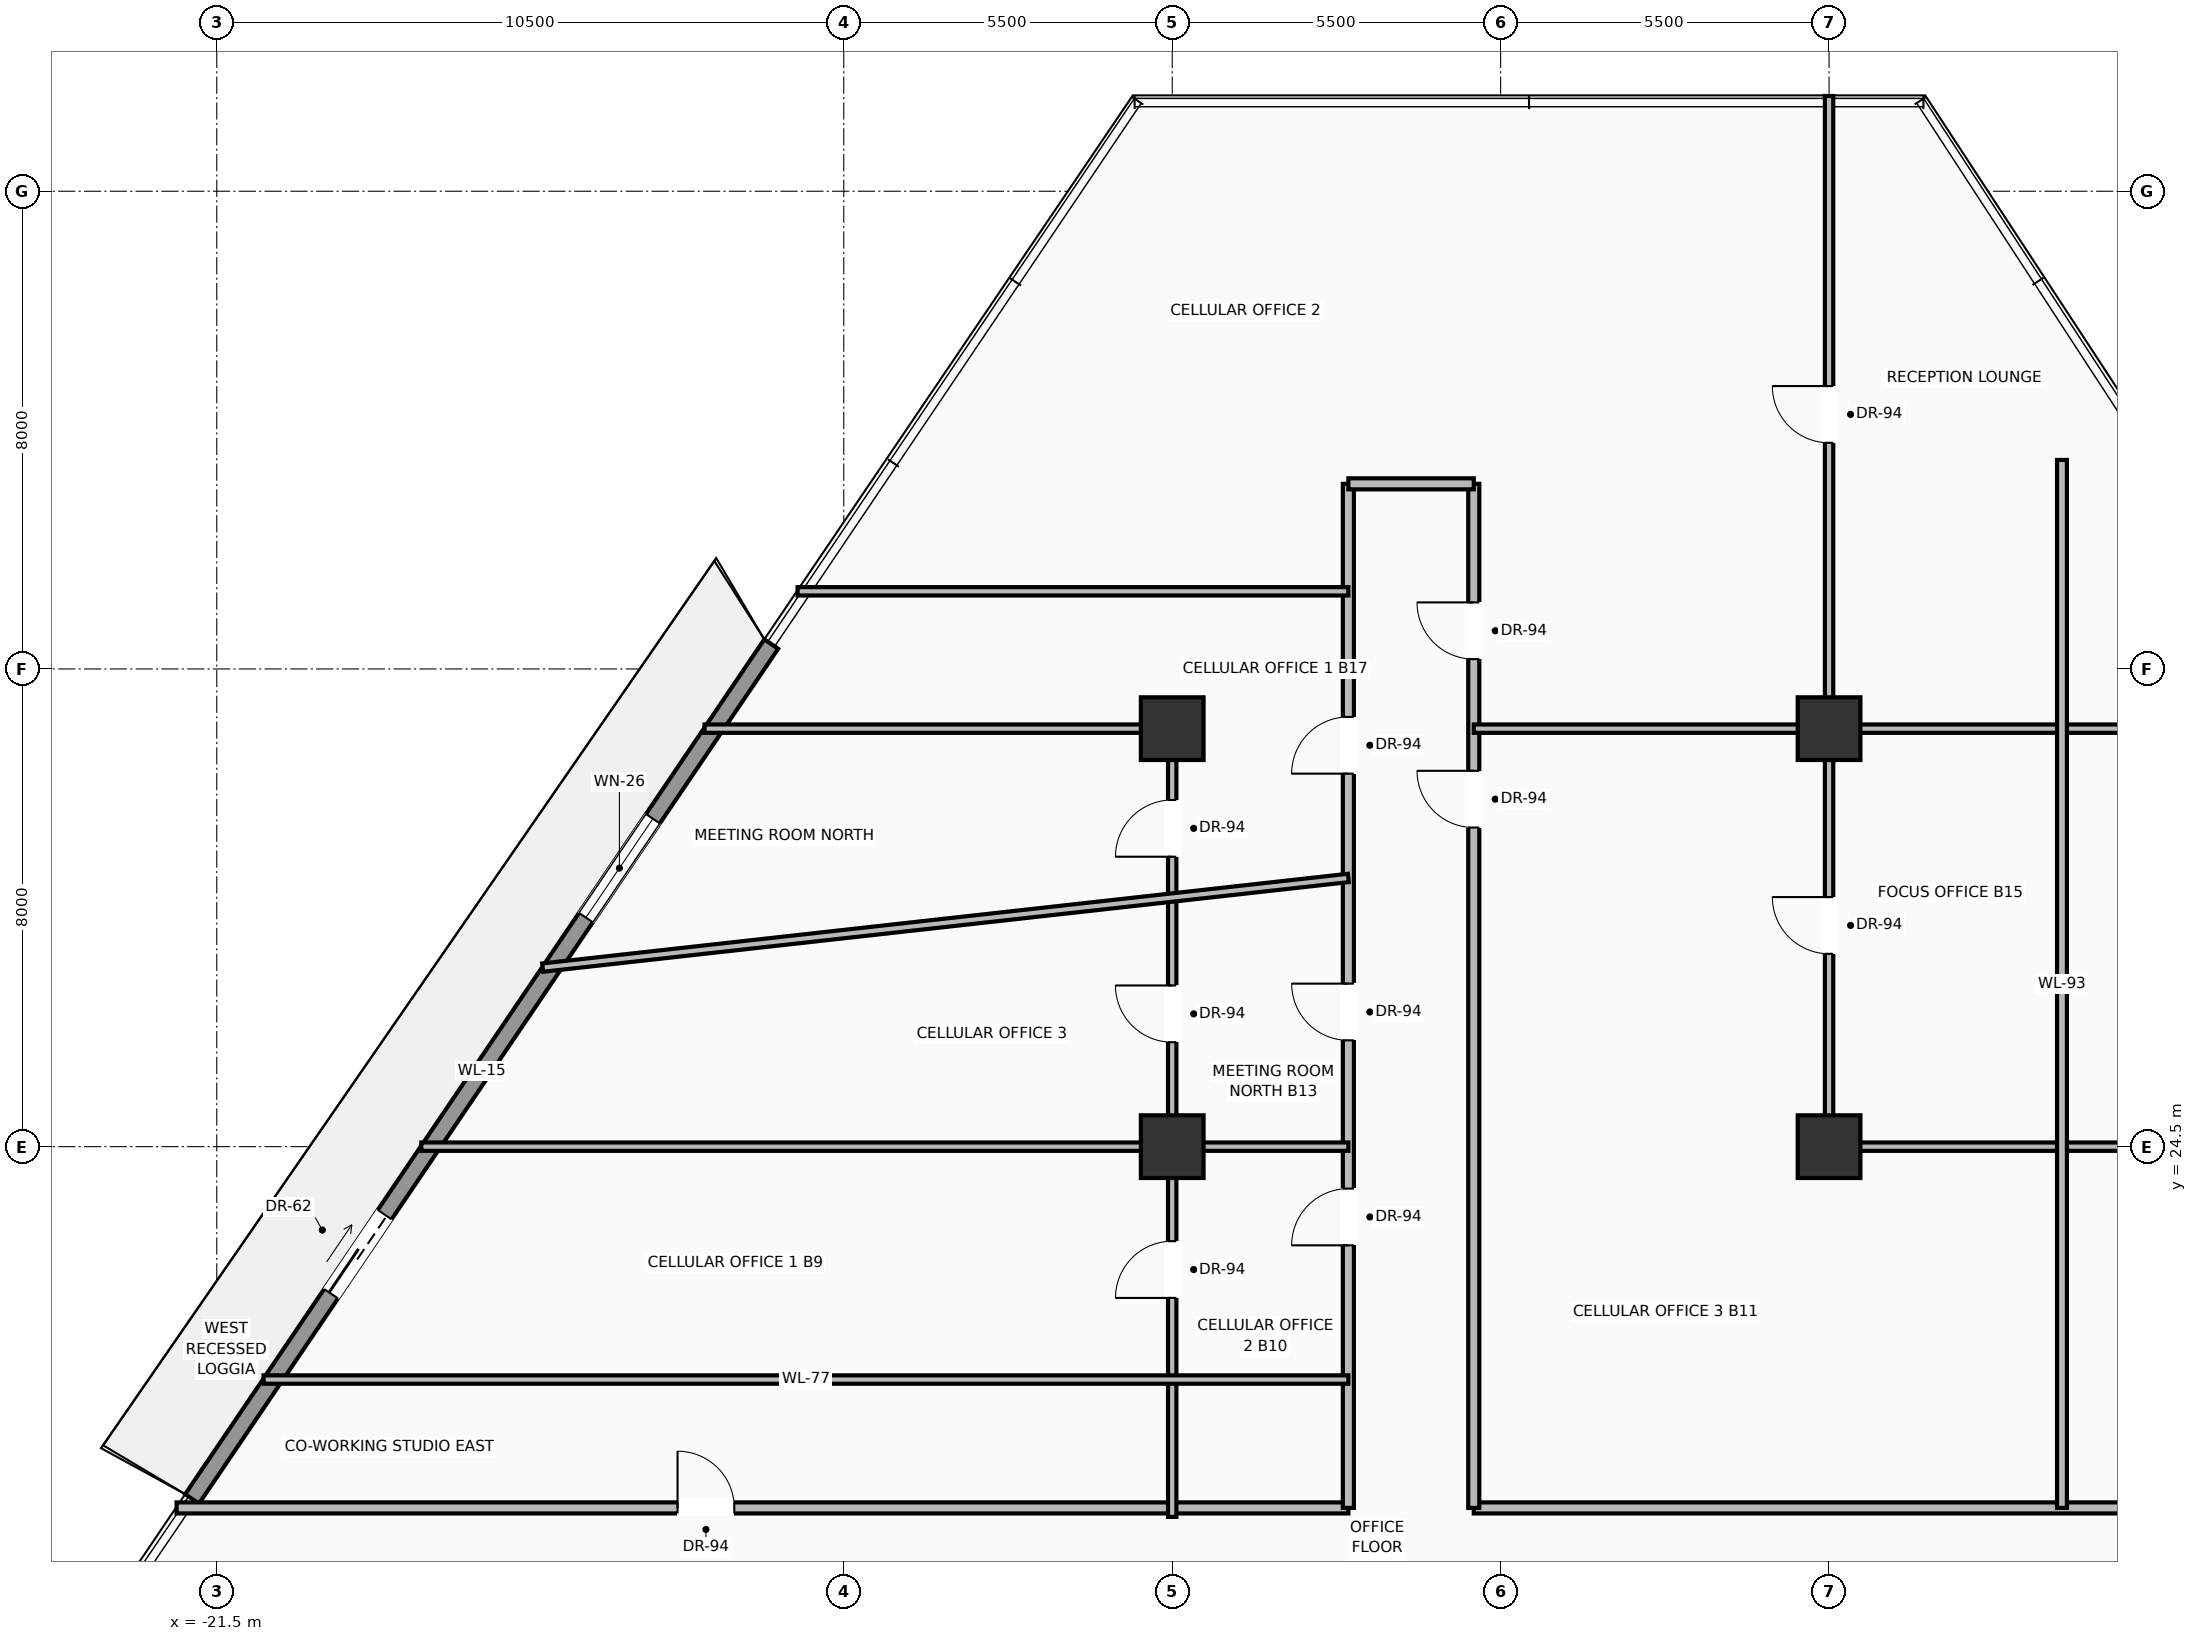
"""IFC4 building model, lengths in metres.
Left out: names, types, materials, properties, quantities, classifications, styles, units other than length and angle.
Written with IfcOpenShell. Run it as: python <this file> out.ifc"""

import sys

from ifc_helpers import new_model, si_unit, direction, frame, frame_2d, origin, origin_2d, place, context, subcontext, project, spatial, rectangle, extrude, source, transform, mapped, element, fill, save


model = new_model("IFC4")
c1 = context("Model", 3, precision=1e-05, world=origin(), true_north=direction((0.0, 1.0)))
c2 = subcontext(c1, "Body", "Model", "MODEL_VIEW")
j1 = project(units=[si_unit("LENGTHUNIT", "METRE"), si_unit("PLANEANGLEUNIT", "RADIAN")], contexts=[c1])
p1 = place(None, origin())
s1 = spatial("IfcSite", under=j1, at=p1, CompositionType="ELEMENT")
p2 = place(p1, origin())
s2 = spatial("IfcBuilding", under=s1, at=p2, CompositionType="ELEMENT")
p3 = place(p2, frame((0.0, 0.0, 76.6)))
s3 = spatial("IfcBuildingStorey", under=s2, at=p3, CompositionType="ELEMENT", Elevation=76.6)
m1 = source(origin(), c2, "Body", "SweptSolid", [
    extrude(rectangle(XDim=1.05, YDim=1.05, at=origin_2d()), origin(), (0.0, 0.0, 1.0), 3.7),
])
for number, where, z_axis, x_axis in (
    (1, (-5.5, 24.5, 0.0), (0.0, 0.0, 1.0), (1.0, 0.0, 0.0)),
    (2, (5.5, 24.5, 0.0), (0.0, 0.0, 1.0), (1.0, 0.0, 0.0)),
    (3, (-5.5, 31.5, 0.0), (0.0, 0.0, 1.0), (1.0, 0.0, 0.0)),
    (4, (5.5, 31.5, 0.0), (0.0, 0.0, 1.0), (1.0, 0.0, 0.0)),
):
    element("IfcColumn", number, at=place(p3, frame(where, z_axis=z_axis, x_axis=x_axis)), inside=s3, PredefinedType="COLUMN", context=c2, shape_type="MappedRepresentation", body=[
        mapped(m1, transform((0.0, 0.0, 0.0), scale=1.0)),
    ])
p4 = place(p3, frame((-21.913, 18.602, 0.0), z_axis=(0.0, 0.0, 1.0), x_axis=(0.560872496689, 0.827902193775, 0.0)))
e5 = element("IfcWall", 5, at=p4, inside=s3, PredefinedType="SOLIDWALL", context=c2, shape_type="SweptSolid", body=[
    extrude(rectangle(XDim=17.291, YDim=0.28, at=frame_2d((8.646, 0.0))), origin(), (0.0, 0.0, 1.0), 3.03),
])
p5 = place(p4, frame((4.15, 0.0, 0.0)))
e6 = element("IfcOpeningElement", 6, at=p5, cuts=e5, PredefinedType="OPENING", context=c2, shape_type="SweptSolid", body=[
    extrude(rectangle(XDim=1.6, YDim=2.35, at=frame_2d((0.8, 1.175))), frame((0.0, 0.15, 0.0), z_axis=(0.0, -1.0, 0.0), x_axis=(1.0, 0.0, 0.0)), (0.0, 0.0, 1.0), 0.3),
])
p6 = place(p4, frame((11.758, 0.0, 0.9)))
e7 = element("IfcOpeningElement", 7, at=p6, cuts=e5, PredefinedType="OPENING", context=c2, shape_type="SweptSolid", body=[
    extrude(rectangle(XDim=2.0, YDim=1.85, at=frame_2d((1.0, 0.925))), frame((0.0, 0.15, 0.0), z_axis=(0.0, -1.0, 0.0), x_axis=(1.0, 0.0, 0.0)), (0.0, 0.0, 1.0), 0.3),
])
p7 = place(p3, frame((-22.173, 18.45, 0.0), z_axis=(0.0, 0.0, 1.0), x_axis=(1.0, 0.0, 0.0)))
e8 = element("IfcWall", 8, at=p7, inside=s3, PredefinedType="PARTITIONING", context=c2, shape_type="SweptSolid", body=[
    extrude(rectangle(XDim=19.623, YDim=0.185, at=frame_2d((9.812, 0.0))), origin(), (0.0, 0.0, 1.0), 2.747),
])
p8 = place(p7, frame((8.389, 0.0, 0.0)))
e9 = element("IfcOpeningElement", 9, at=p8, cuts=e8, PredefinedType="OPENING", context=c2, shape_type="SweptSolid", body=[
    extrude(rectangle(XDim=0.95, YDim=2.2, at=frame_2d((0.475, 1.1))), frame((0.0, 0.103, 0.0), z_axis=(0.0, -1.0, 0.0), x_axis=(1.0, 0.0, 0.0)), (0.0, 0.0, 1.0), 0.205),
])
p9 = place(p3, frame((-0.45, 18.45, 0.0), z_axis=(0.0, 0.0, 1.0), x_axis=(1.0, 0.0, 0.0)))
e10 = element("IfcWall", 10, at=p9, inside=s3, PredefinedType="PARTITIONING", context=c2, shape_type="SweptSolid", body=[
    extrude(rectangle(XDim=23.04, YDim=0.185, at=frame_2d((11.52, 0.0))), origin(), (0.0, 0.0, 1.0), 2.747),
])
p10 = place(p9, frame((12.163, 0.0, 0.0)))
e11 = element("IfcOpeningElement", 11, at=p10, cuts=e10, PredefinedType="OPENING", context=c2, shape_type="SweptSolid", body=[
    extrude(rectangle(XDim=0.95, YDim=2.2, at=frame_2d((0.475, 1.1))), frame((0.0, 0.103, 0.0), z_axis=(0.0, -1.0, 0.0), x_axis=(1.0, 0.0, 0.0)), (0.0, 0.0, 1.0), 0.205),
])
p11 = place(p3, frame((-2.55, 18.45, 0.0), z_axis=(0.0, 0.0, 1.0), x_axis=(0.0, 1.0, 0.0)))
e12 = element("IfcWall", 12, at=p11, inside=s3, PredefinedType="PARTITIONING", context=c2, shape_type="SweptSolid", body=[
    extrude(rectangle(XDim=17.15, YDim=0.185, at=frame_2d((8.575, 0.0))), origin(), (0.0, 0.0, 1.0), 2.747),
])
p12 = place(p11, frame((4.397, 0.0, 0.0)))
e13 = element("IfcOpeningElement", 13, at=p12, cuts=e12, PredefinedType="OPENING", context=c2, shape_type="SweptSolid", body=[
    extrude(rectangle(XDim=0.95, YDim=2.2, at=frame_2d((0.475, 1.1))), frame((0.0, 0.103, 0.0), z_axis=(0.0, -1.0, 0.0), x_axis=(1.0, 0.0, 0.0)), (0.0, 0.0, 1.0), 0.205),
])
p13 = place(p11, frame((7.83, 0.0, 0.0)))
e14 = element("IfcOpeningElement", 14, at=p13, cuts=e12, PredefinedType="OPENING", context=c2, shape_type="SweptSolid", body=[
    extrude(rectangle(XDim=0.95, YDim=2.2, at=frame_2d((0.475, 1.1))), frame((0.0, 0.103, 0.0), z_axis=(0.0, -1.0, 0.0), x_axis=(1.0, 0.0, 0.0)), (0.0, 0.0, 1.0), 0.205),
])
p14 = place(p11, frame((12.296, 0.0, 0.0)))
e15 = element("IfcOpeningElement", 15, at=p14, cuts=e12, PredefinedType="OPENING", context=c2, shape_type="SweptSolid", body=[
    extrude(rectangle(XDim=0.95, YDim=2.2, at=frame_2d((0.475, 1.1))), frame((0.0, 0.103, 0.0), z_axis=(0.0, -1.0, 0.0), x_axis=(1.0, 0.0, 0.0)), (0.0, 0.0, 1.0), 0.205),
])
p15 = place(p3, frame((-0.45, 18.45, 0.0), z_axis=(0.0, 0.0, 1.0), x_axis=(0.0, 1.0, 0.0)))
e16 = element("IfcWall", 16, at=p15, inside=s3, PredefinedType="PARTITIONING", context=c2, shape_type="SweptSolid", body=[
    extrude(rectangle(XDim=17.15, YDim=0.185, at=frame_2d((8.575, 0.0))), origin(), (0.0, 0.0, 1.0), 2.747),
])
p16 = place(p15, frame((11.394, 0.0, 0.0)))
e17 = element("IfcOpeningElement", 17, at=p16, cuts=e16, PredefinedType="OPENING", context=c2, shape_type="SweptSolid", body=[
    extrude(rectangle(XDim=0.95, YDim=2.2, at=frame_2d((0.475, 1.1))), frame((0.0, 0.103, 0.0), z_axis=(0.0, -1.0, 0.0), x_axis=(1.0, 0.0, 0.0)), (0.0, 0.0, 1.0), 0.205),
])
p17 = place(p15, frame((14.214, 0.0, 0.0)))
e18 = element("IfcOpeningElement", 18, at=p17, cuts=e16, PredefinedType="OPENING", context=c2, shape_type="SweptSolid", body=[
    extrude(rectangle(XDim=0.95, YDim=2.2, at=frame_2d((0.475, 1.1))), frame((0.0, 0.103, 0.0), z_axis=(0.0, -1.0, 0.0), x_axis=(1.0, 0.0, 0.0)), (0.0, 0.0, 1.0), 0.205),
])
p18 = place(p3, frame((-2.55, 35.6, 0.0), z_axis=(0.0, 0.0, 1.0), x_axis=(1.0, 0.0, 0.0)))
e19 = element("IfcWall", 19, at=p18, inside=s3, PredefinedType="PARTITIONING", context=c2, shape_type="SweptSolid", body=[
    extrude(rectangle(XDim=2.1, YDim=0.185, at=frame_2d((1.05, 0.0))), origin(), (0.0, 0.0, 1.0), 3.442),
])
p19 = place(p3, frame((-5.5, 18.3, 0.0), z_axis=(0.0, 0.0, 1.0), x_axis=(0.0, 1.0, 0.0)))
e20 = element("IfcWall", 20, at=p19, inside=s3, PredefinedType="PARTITIONING", context=c2, shape_type="SweptSolid", body=[
    extrude(rectangle(XDim=13.2, YDim=0.14, at=frame_2d((6.6, 0.0))), origin(), (0.0, 0.0, 1.0), 2.747),
])
p20 = place(p19, frame((3.667, 0.0, 0.0)))
e21 = element("IfcOpeningElement", 21, at=p20, cuts=e20, PredefinedType="OPENING", context=c2, shape_type="SweptSolid", body=[
    extrude(rectangle(XDim=0.95, YDim=2.2, at=frame_2d((0.475, 1.1))), frame((0.0, 0.08, 0.0), z_axis=(0.0, -1.0, 0.0), x_axis=(1.0, 0.0, 0.0)), (0.0, 0.0, 1.0), 0.16),
])
p21 = place(p19, frame((7.949, 0.0, 0.0)))
e22 = element("IfcOpeningElement", 22, at=p21, cuts=e20, PredefinedType="OPENING", context=c2, shape_type="SweptSolid", body=[
    extrude(rectangle(XDim=0.95, YDim=2.2, at=frame_2d((0.475, 1.1))), frame((0.0, 0.08, 0.0), z_axis=(0.0, -1.0, 0.0), x_axis=(1.0, 0.0, 0.0)), (0.0, 0.0, 1.0), 0.16),
])
p22 = place(p19, frame((11.055, 0.0, 0.0)))
e23 = element("IfcOpeningElement", 23, at=p22, cuts=e20, PredefinedType="OPENING", context=c2, shape_type="SweptSolid", body=[
    extrude(rectangle(XDim=0.95, YDim=2.2, at=frame_2d((0.475, 1.1))), frame((0.0, 0.08, 0.0), z_axis=(0.0, -1.0, 0.0), x_axis=(1.0, 0.0, 0.0)), (0.0, 0.0, 1.0), 0.16),
])
p23 = place(p3, frame((5.5, 24.5, 0.0), z_axis=(0.0, 0.0, 1.0), x_axis=(0.0, 1.0, 0.0)))
e24 = element("IfcWall", 24, at=p23, inside=s3, PredefinedType="PARTITIONING", context=c2, shape_type="SweptSolid", body=[
    extrude(rectangle(XDim=17.595, YDim=0.14, at=frame_2d((8.798, 0.0))), origin(), (0.0, 0.0, 1.0), 2.747),
])
p24 = place(p23, frame((3.23, 0.0, 0.0)))
e25 = element("IfcOpeningElement", 25, at=p24, cuts=e24, PredefinedType="OPENING", context=c2, shape_type="SweptSolid", body=[
    extrude(rectangle(XDim=0.95, YDim=2.2, at=frame_2d((0.475, 1.1))), frame((0.0, 0.08, 0.0), z_axis=(0.0, -1.0, 0.0), x_axis=(1.0, 0.0, 0.0)), (0.0, 0.0, 1.0), 0.16),
])
p25 = place(p23, frame((11.787, 0.0, 0.0)))
e26 = element("IfcOpeningElement", 26, at=p25, cuts=e24, PredefinedType="OPENING", context=c2, shape_type="SweptSolid", body=[
    extrude(rectangle(XDim=0.95, YDim=2.2, at=frame_2d((0.475, 1.1))), frame((0.0, 0.08, 0.0), z_axis=(0.0, -1.0, 0.0), x_axis=(1.0, 0.0, 0.0)), (0.0, 0.0, 1.0), 0.16),
])
p26 = place(p3, frame((-13.332, 31.5, 0.0), z_axis=(0.0, 0.0, 1.0), x_axis=(1.0, 0.0, 0.0)))
e27 = element("IfcWall", 27, at=p26, inside=s3, PredefinedType="PARTITIONING", context=c2, shape_type="SweptSolid", body=[
    extrude(rectangle(XDim=7.832, YDim=0.14, at=frame_2d((3.916, 0.0))), origin(), (0.0, 0.0, 1.0), 2.747),
])
p27 = place(p3, frame((5.5, 24.5, 0.0), z_axis=(0.0, 0.0, 1.0), x_axis=(1.0, 0.0, 0.0)))
e28 = element("IfcWall", 28, at=p27, inside=s3, PredefinedType="PARTITIONING", context=c2, shape_type="SweptSolid", body=[
    extrude(rectangle(XDim=13.128, YDim=0.14, at=frame_2d((6.564, 0.0))), origin(), (0.0, 0.0, 1.0), 2.747),
])
p28 = place(p27, frame((7.803, 0.0, 0.0)))
e29 = element("IfcOpeningElement", 29, at=p28, cuts=e28, PredefinedType="OPENING", context=c2, shape_type="SweptSolid", body=[
    extrude(rectangle(XDim=0.95, YDim=2.2, at=frame_2d((0.475, 1.1))), frame((0.0, 0.08, 0.0), z_axis=(0.0, -1.0, 0.0), x_axis=(1.0, 0.0, 0.0)), (0.0, 0.0, 1.0), 0.16),
])
p29 = place(p3, frame((-20.716, 20.6, 0.0), z_axis=(0.0, 0.0, 1.0), x_axis=(1.0, 0.0, 0.0)))
e30 = element("IfcWall", 30, at=p29, inside=s3, PredefinedType="PARTITIONING", context=c2, shape_type="SweptSolid", body=[
    extrude(rectangle(XDim=18.166, YDim=0.14, at=frame_2d((9.083, 0.0))), origin(), (0.0, 0.0, 1.0), 2.747),
])
p30 = place(p3, frame((-18.074, 24.5, 0.0), z_axis=(0.0, 0.0, 1.0), x_axis=(1.0, 0.0, 0.0)))
e31 = element("IfcWall", 31, at=p30, inside=s3, PredefinedType="PARTITIONING", context=c2, shape_type="SweptSolid", body=[
    extrude(rectangle(XDim=15.524, YDim=0.14, at=frame_2d((7.762, 0.0))), origin(), (0.0, 0.0, 1.0), 2.747),
])
p31 = place(p3, frame((-16.043, 27.498, 0.0), z_axis=(0.0, 0.0, 1.0), x_axis=(0.993863542096, 0.110613108137, 0.0)))
e32 = element("IfcWall", 32, at=p31, inside=s3, PredefinedType="PARTITIONING", context=c2, shape_type="SweptSolid", body=[
    extrude(rectangle(XDim=13.576, YDim=0.14, at=frame_2d((6.788, 0.0))), origin(), (0.0, 0.0, 1.0), 2.747),
])
p32 = place(p3, frame((-11.774, 33.8, 0.0), z_axis=(0.0, 0.0, 1.0), x_axis=(1.0, 0.0, 0.0)))
e33 = element("IfcWall", 33, at=p32, inside=s3, PredefinedType="PARTITIONING", context=c2, shape_type="SweptSolid", body=[
    extrude(rectangle(XDim=9.224, YDim=0.14, at=frame_2d((4.612, 0.0))), origin(), (0.0, 0.0, 1.0), 2.747),
])
p33 = place(p3, frame((-0.45, 31.5, 0.0), z_axis=(0.0, 0.0, 1.0), x_axis=(1.0, 0.0, 0.0)))
e34 = element("IfcWall", 34, at=p33, inside=s3, PredefinedType="PARTITIONING", context=c2, shape_type="SweptSolid", body=[
    extrude(rectangle(XDim=14.493, YDim=0.14, at=frame_2d((7.247, 0.0))), origin(), (0.0, 0.0, 1.0), 2.747),
])
p34 = place(p3, frame((9.4, 18.45, 0.0), z_axis=(0.0, 0.0, 1.0), x_axis=(0.0, 1.0, 0.0)))
e35 = element("IfcWall", 35, at=p34, inside=s3, PredefinedType="PARTITIONING", context=c2, shape_type="SweptSolid", body=[
    extrude(rectangle(XDim=17.55, YDim=0.165, at=frame_2d((8.775, 0.0))), origin(), (0.0, 0.0, 1.0), 2.747),
])
m2 = source(origin(), c2, "Body", "SweptSolid", [
    extrude(rectangle(XDim=1.6, YDim=2.35, at=frame_2d((0.8, 1.175))), frame((0.0, 0.025, 0.0), z_axis=(0.0, -1.0, 0.0), x_axis=(1.0, 0.0, 0.0)), (0.0, 0.0, 1.0), 0.05),
])
p35 = place(p5, origin())
e36 = element("IfcDoor", 36, at=p35, inside=s3, OperationType="SLIDING_TO_LEFT", PredefinedType="DOOR", context=c2, shape_type="MappedRepresentation", body=[
    mapped(m2, transform((0.0, 0.0, 0.0), scale=1.0)),
])
fill(e6, e36)
m3 = source(origin(), c2, "Body", "SweptSolid", [
    extrude(rectangle(XDim=2.0, YDim=1.85, at=frame_2d((1.0, 0.925))), frame((0.0, 0.03, 0.0), z_axis=(0.0, -1.0, 0.0), x_axis=(1.0, 0.0, 0.0)), (0.0, 0.0, 1.0), 0.06),
])
p36 = place(p6, origin())
e37 = element("IfcWindow", 37, at=p36, inside=s3, PartitioningType="SINGLE_PANEL", PredefinedType="WINDOW", context=c2, shape_type="MappedRepresentation", body=[
    mapped(m3, transform((0.0, 0.0, 0.0), scale=1.0)),
])
fill(e7, e37)
m4 = source(origin(), c2, "Body", "SweptSolid", [
    extrude(rectangle(XDim=0.95, YDim=2.2, at=frame_2d((0.475, 1.1))), frame((0.0, 0.025, 0.0), z_axis=(0.0, -1.0, 0.0), x_axis=(1.0, 0.0, 0.0)), (0.0, 0.0, 1.0), 0.05),
])
p37 = place(p8, origin())
e38 = element("IfcDoor", 38, at=p37, inside=s3, OperationType="SINGLE_SWING_LEFT", PredefinedType="DOOR", context=c2, shape_type="MappedRepresentation", body=[
    mapped(m4, transform((0.0, 0.0, 0.0), scale=1.0)),
])
fill(e9, e38)
p38 = place(p12, origin())
e39 = element("IfcDoor", 39, at=p38, inside=s3, OperationType="SINGLE_SWING_LEFT", PredefinedType="DOOR", context=c2, shape_type="MappedRepresentation", body=[
    mapped(m4, transform((0.0, 0.0, 0.0), scale=1.0)),
])
fill(e13, e39)
p39 = place(p16, origin())
e40 = element("IfcDoor", 40, at=p39, inside=s3, OperationType="SINGLE_SWING_RIGHT", PredefinedType="DOOR", context=c2, shape_type="MappedRepresentation", body=[
    mapped(m4, transform((0.0, 0.0, 0.0), scale=1.0)),
])
fill(e17, e40)
p40 = place(p20, origin())
e41 = element("IfcDoor", 41, at=p40, inside=s3, OperationType="SINGLE_SWING_LEFT", PredefinedType="DOOR", context=c2, shape_type="MappedRepresentation", body=[
    mapped(m4, transform((0.0, 0.0, 0.0), scale=1.0)),
])
fill(e21, e41)
p41 = place(p13, origin())
e42 = element("IfcDoor", 42, at=p41, inside=s3, OperationType="SINGLE_SWING_RIGHT", PredefinedType="DOOR", context=c2, shape_type="MappedRepresentation", body=[
    mapped(m4, transform((0.0, 0.0, 0.0), scale=1.0)),
])
fill(e14, e42)
p42 = place(p24, origin())
e43 = element("IfcDoor", 43, at=p42, inside=s3, OperationType="SINGLE_SWING_RIGHT", PredefinedType="DOOR", context=c2, shape_type="MappedRepresentation", body=[
    mapped(m4, transform((0.0, 0.0, 0.0), scale=1.0)),
])
fill(e25, e43)
p43 = place(p14, origin())
e44 = element("IfcDoor", 44, at=p43, inside=s3, OperationType="SINGLE_SWING_LEFT", PredefinedType="DOOR", context=c2, shape_type="MappedRepresentation", body=[
    mapped(m4, transform((0.0, 0.0, 0.0), scale=1.0)),
])
fill(e15, e44)
p44 = place(p17, origin())
e45 = element("IfcDoor", 45, at=p44, inside=s3, OperationType="SINGLE_SWING_RIGHT", PredefinedType="DOOR", context=c2, shape_type="MappedRepresentation", body=[
    mapped(m4, transform((0.0, 0.0, 0.0), scale=1.0)),
])
fill(e18, e45)
p45 = place(p21, origin())
e46 = element("IfcDoor", 46, at=p45, inside=s3, OperationType="SINGLE_SWING_RIGHT", PredefinedType="DOOR", context=c2, shape_type="MappedRepresentation", body=[
    mapped(m4, transform((0.0, 0.0, 0.0), scale=1.0)),
])
fill(e22, e46)
p46 = place(p22, origin())
e47 = element("IfcDoor", 47, at=p46, inside=s3, OperationType="SINGLE_SWING_LEFT", PredefinedType="DOOR", context=c2, shape_type="MappedRepresentation", body=[
    mapped(m4, transform((0.0, 0.0, 0.0), scale=1.0)),
])
fill(e23, e47)
p47 = place(p25, origin())
e48 = element("IfcDoor", 48, at=p47, inside=s3, OperationType="SINGLE_SWING_RIGHT", PredefinedType="DOOR", context=c2, shape_type="MappedRepresentation", body=[
    mapped(m4, transform((0.0, 0.0, 0.0), scale=1.0)),
])
fill(e26, e48)
save(model, sys.argv[1])
